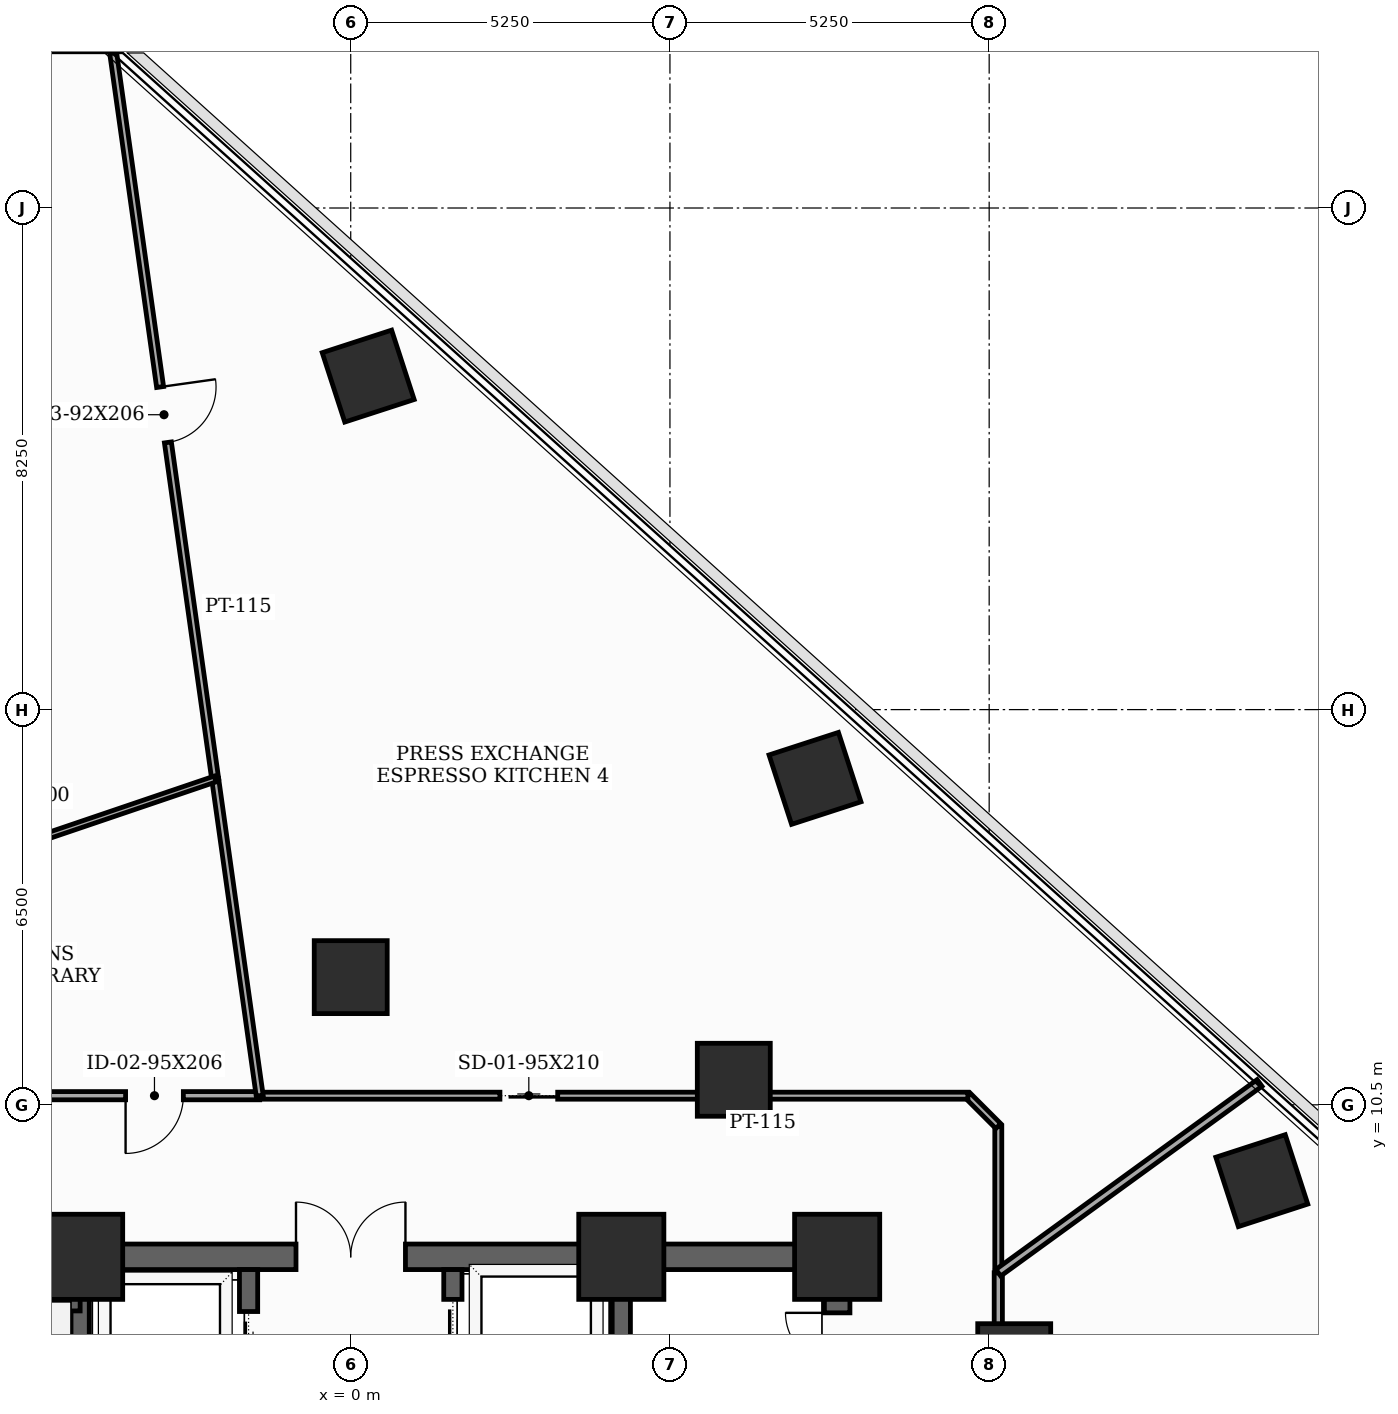
"""IFC4 building model, lengths in metres.
Left out: names, types, materials, properties, quantities, classifications, styles, units other than length and angle.
Written with IfcOpenShell. Run it as: python <this file> out.ifc"""

import sys

from ifc_helpers import new_model, si_unit, direction, frame, frame_2d, origin, origin_2d, place, context, subcontext, project, spatial, rectangle, extrude, element, fill, save


model = new_model("IFC4")
c1 = context("Model", 3, precision=1e-05, world=origin(), true_north=direction((0.0, 1.0)))
c2 = subcontext(c1, "Body", "Model", "MODEL_VIEW")
j1 = project(units=[si_unit("LENGTHUNIT", "METRE"), si_unit("PLANEANGLEUNIT", "RADIAN")], contexts=[c1])
p1 = place(None, origin())
s1 = spatial("IfcSite", under=j1, at=p1, CompositionType="ELEMENT")
p2 = place(p1, origin())
s2 = spatial("IfcBuilding", under=s1, at=p2, CompositionType="ELEMENT")
p3 = place(p2, frame((0.0, 0.0, 116.2)))
s3 = spatial("IfcBuildingStorey", under=s2, at=p3, CompositionType="ELEMENT", Elevation=116.2)
for number, where, z_axis, x_axis in (
    (1, (8.0, 8.0, 0.0), (0.0, 0.0, 1.0), (1.0, 0.0, 0.0)),
    (2, (4.45, 8.0, 0.0), (0.0, 0.0, 1.0), (1.0, 0.0, 0.0)),
    (3, (-4.45, 8.0, 0.0), (0.0, 0.0, 1.0), (1.0, 0.0, 0.0)),
):
    element("IfcColumn", number, at=place(p3, frame(where, z_axis=z_axis, x_axis=x_axis)), inside=s3, PredefinedType="COLUMN", context=c2, shape_type="SweptSolid", body=[
        extrude(rectangle(XDim=1.4, YDim=1.4, at=origin_2d()), origin(), (0.0, 0.0, 1.0), 3.7),
    ])
for number, where, z_axis, x_axis in (
    (4, (10.912, 6.3, 0.0), (0.0, 0.0, 1.0), (1.0, 0.0, 0.0)),
    (5, (6.3, 10.912, 0.0), (0.0, 0.0, 1.0), (1.0, 0.0, 0.0)),
    (6, (0.0, 12.6, 0.0), (0.0, 0.0, 1.0), (1.0, 0.0, 0.0)),
    (7, (14.984, 9.252, 0.0), (0.0, 0.0, 1.0), (0.951, 0.309, 0.0)),
    (8, (7.635, 15.869, 0.0), (0.0, 0.0, 1.0), (0.951, 0.309, 0.0)),
    (9, (0.287, 22.485, 0.0), (0.0, 0.0, 1.0), (0.951, 0.309, 0.0)),
):
    element("IfcColumn", number, at=place(p3, frame(where, z_axis=z_axis, x_axis=x_axis)), inside=s3, PredefinedType="COLUMN", context=c2, shape_type="SweptSolid", body=[
        extrude(rectangle(XDim=1.2, YDim=1.2, at=origin_2d()), origin(), (0.0, 0.0, 1.0), 3.7),
    ])
p4 = place(p3, frame((8.0, -8.0, 0.0), z_axis=(0.0, 0.0, 1.0), x_axis=(0.0, 1.0, 0.0)))
e10 = element("IfcWall", 10, at=p4, inside=s3, PredefinedType="SHEAR", context=c2, shape_type="SweptSolid", body=[
    extrude(rectangle(XDim=16.0, YDim=0.42, at=frame_2d((8.0, 0.0))), origin(), (0.0, 0.0, 1.0), 3.5),
])
p5 = place(p4, frame((9.6, 0.0, 0.0)))
e11 = element("IfcOpeningElement", 11, at=p5, cuts=e10, PredefinedType="OPENING", context=c2, shape_type="SweptSolid", body=[
    extrude(rectangle(XDim=1.05, YDim=2.15, at=frame_2d((0.525, 1.075))), frame((0.0, 0.22, 0.0), z_axis=(0.0, -1.0, 0.0), x_axis=(1.0, 0.0, 0.0)), (0.0, 0.0, 1.0), 0.44),
])
p6 = place(p4, frame((14.229, 0.0, 0.0)))
e12 = element("IfcOpeningElement", 12, at=p6, cuts=e10, PredefinedType="OPENING", context=c2, shape_type="SweptSolid", body=[
    extrude(rectangle(XDim=0.85, YDim=2.02, at=frame_2d((0.425, 1.01))), frame((0.0, 0.22, 0.0), z_axis=(0.0, -1.0, 0.0), x_axis=(1.0, 0.0, 0.0)), (0.0, 0.0, 1.0), 0.44),
])
p7 = place(p3, frame((-8.0, 8.0, 0.0), z_axis=(0.0, 0.0, 1.0), x_axis=(1.0, 0.0, 0.0)))
e13 = element("IfcWall", 13, at=p7, inside=s3, PredefinedType="SHEAR", context=c2, shape_type="SweptSolid", body=[
    extrude(rectangle(XDim=16.0, YDim=0.42, at=frame_2d((8.0, 0.0))), origin(), (0.0, 0.0, 1.0), 3.5),
])
p8 = place(p7, frame((7.1, 0.0, 0.0)))
e14 = element("IfcOpeningElement", 14, at=p8, cuts=e13, PredefinedType="OPENING", context=c2, shape_type="SweptSolid", body=[
    extrude(rectangle(XDim=1.8, YDim=2.15, at=frame_2d((0.9, 1.075))), frame((0.0, 0.22, 0.0), z_axis=(0.0, -1.0, 0.0), x_axis=(1.0, 0.0, 0.0)), (0.0, 0.0, 1.0), 0.44),
])
for number, where, z_axis, x_axis in (
    (15, (-4.45, -7.79, 0.0), (0.0, 0.0, 1.0), (0.0, 1.0, 0.0)),
    (16, (4.45, -7.79, 0.0), (0.0, 0.0, 1.0), (0.0, 1.0, 0.0)),
):
    element("IfcWall", number, at=place(p3, frame(where, z_axis=z_axis, x_axis=x_axis)), inside=s3, PredefinedType="SHEAR", context=c2, shape_type="SweptSolid", body=[
        extrude(rectangle(XDim=15.58, YDim=0.3, at=frame_2d((7.79, 0.0))), origin(), (0.0, 0.0, 1.0), 3.5),
    ])
p9 = place(p3, frame((-7.79, 7.26, 0.0), z_axis=(0.0, 0.0, 1.0), x_axis=(1.0, 0.0, 0.0)))
e17 = element("IfcWall", 17, at=p9, inside=s3, PredefinedType="SHEAR", context=c2, shape_type="SweptSolid", body=[
    extrude(rectangle(XDim=3.34, YDim=0.3, at=frame_2d((1.67, 0.0))), origin(), (0.0, 0.0, 1.0), 3.5),
])
p10 = place(p3, frame((-1.68, -4.85, 0.0), z_axis=(0.0, 0.0, 1.0), x_axis=(0.0, 1.0, 0.0)))
e18 = element("IfcWall", 18, at=p10, inside=s3, PredefinedType="SHEAR", context=c2, shape_type="SweptSolid", body=[
    extrude(rectangle(XDim=12.64, YDim=0.3, at=frame_2d((6.32, 0.0))), origin(), (0.0, 0.0, 1.0), 3.5),
])
p11 = place(p10, frame((3.95, 0.0, 0.0)))
e19 = element("IfcOpeningElement", 19, at=p11, cuts=e18, PredefinedType="OPENING", context=c2, shape_type="SweptSolid", body=[
    extrude(rectangle(XDim=1.1, YDim=2.1, at=frame_2d((0.55, 1.05))), frame((0.0, 0.16, 0.0), z_axis=(0.0, -1.0, 0.0), x_axis=(1.0, 0.0, 0.0)), (0.0, 0.0, 1.0), 0.32),
])
p12 = place(p10, frame((6.25, 0.0, 0.0)))
e20 = element("IfcOpeningElement", 20, at=p12, cuts=e18, PredefinedType="OPENING", context=c2, shape_type="SweptSolid", body=[
    extrude(rectangle(XDim=1.1, YDim=2.1, at=frame_2d((0.55, 1.05))), frame((0.0, 0.16, 0.0), z_axis=(0.0, -1.0, 0.0), x_axis=(1.0, 0.0, 0.0)), (0.0, 0.0, 1.0), 0.32),
])
p13 = place(p10, frame((8.55, 0.0, 0.0)))
e21 = element("IfcOpeningElement", 21, at=p13, cuts=e18, PredefinedType="OPENING", context=c2, shape_type="SweptSolid", body=[
    extrude(rectangle(XDim=1.1, YDim=2.1, at=frame_2d((0.55, 1.05))), frame((0.0, 0.16, 0.0), z_axis=(0.0, -1.0, 0.0), x_axis=(1.0, 0.0, 0.0)), (0.0, 0.0, 1.0), 0.32),
])
p14 = place(p10, frame((10.85, 0.0, 0.0)))
e22 = element("IfcOpeningElement", 22, at=p14, cuts=e18, PredefinedType="OPENING", context=c2, shape_type="SweptSolid", body=[
    extrude(rectangle(XDim=1.1, YDim=2.1, at=frame_2d((0.55, 1.05))), frame((0.0, 0.16, 0.0), z_axis=(0.0, -1.0, 0.0), x_axis=(1.0, 0.0, 0.0)), (0.0, 0.0, 1.0), 0.32),
])
p15 = place(p10, frame((0.45, 0.0, 0.0)))
e23 = element("IfcOpeningElement", 23, at=p15, cuts=e18, PredefinedType="OPENING", context=c2, shape_type="SweptSolid", body=[
    extrude(rectangle(XDim=0.85, YDim=2.02, at=frame_2d((0.425, 1.01))), frame((0.0, 0.16, 0.0), z_axis=(0.0, -1.0, 0.0), x_axis=(1.0, 0.0, 0.0)), (0.0, 0.0, 1.0), 0.32),
])
p16 = place(p10, frame((2.05, 0.0, 0.0)))
e24 = element("IfcOpeningElement", 24, at=p16, cuts=e18, PredefinedType="OPENING", context=c2, shape_type="SweptSolid", body=[
    extrude(rectangle(XDim=0.85, YDim=2.02, at=frame_2d((0.425, 1.01))), frame((0.0, 0.16, 0.0), z_axis=(0.0, -1.0, 0.0), x_axis=(1.0, 0.0, 0.0)), (0.0, 0.0, 1.0), 0.32),
])
p17 = place(p3, frame((1.68, -4.85, 0.0), z_axis=(0.0, 0.0, 1.0), x_axis=(0.0, 1.0, 0.0)))
e25 = element("IfcWall", 25, at=p17, inside=s3, PredefinedType="SHEAR", context=c2, shape_type="SweptSolid", body=[
    extrude(rectangle(XDim=12.64, YDim=0.3, at=frame_2d((6.32, 0.0))), origin(), (0.0, 0.0, 1.0), 3.5),
])
p18 = place(p17, frame((0.55, 0.0, 0.0)))
e26 = element("IfcOpeningElement", 26, at=p18, cuts=e25, PredefinedType="OPENING", context=c2, shape_type="SweptSolid", body=[
    extrude(rectangle(XDim=1.1, YDim=2.1, at=frame_2d((0.55, 1.05))), frame((0.0, 0.16, 0.0), z_axis=(0.0, -1.0, 0.0), x_axis=(1.0, 0.0, 0.0)), (0.0, 0.0, 1.0), 0.32),
])
p19 = place(p17, frame((2.65, 0.0, 0.0)))
e27 = element("IfcOpeningElement", 27, at=p19, cuts=e25, PredefinedType="OPENING", context=c2, shape_type="SweptSolid", body=[
    extrude(rectangle(XDim=1.1, YDim=2.1, at=frame_2d((0.55, 1.05))), frame((0.0, 0.16, 0.0), z_axis=(0.0, -1.0, 0.0), x_axis=(1.0, 0.0, 0.0)), (0.0, 0.0, 1.0), 0.32),
])
p20 = place(p17, frame((4.75, 0.0, 0.0)))
e28 = element("IfcOpeningElement", 28, at=p20, cuts=e25, PredefinedType="OPENING", context=c2, shape_type="SweptSolid", body=[
    extrude(rectangle(XDim=1.1, YDim=2.1, at=frame_2d((0.55, 1.05))), frame((0.0, 0.16, 0.0), z_axis=(0.0, -1.0, 0.0), x_axis=(1.0, 0.0, 0.0)), (0.0, 0.0, 1.0), 0.32),
])
p21 = place(p17, frame((6.85, 0.0, 0.0)))
e29 = element("IfcOpeningElement", 29, at=p21, cuts=e25, PredefinedType="OPENING", context=c2, shape_type="SweptSolid", body=[
    extrude(rectangle(XDim=1.1, YDim=2.1, at=frame_2d((0.55, 1.05))), frame((0.0, 0.16, 0.0), z_axis=(0.0, -1.0, 0.0), x_axis=(1.0, 0.0, 0.0)), (0.0, 0.0, 1.0), 0.32),
])
p22 = place(p17, frame((8.95, 0.0, 0.0)))
e30 = element("IfcOpeningElement", 30, at=p22, cuts=e25, PredefinedType="OPENING", context=c2, shape_type="SweptSolid", body=[
    extrude(rectangle(XDim=1.1, YDim=2.1, at=frame_2d((0.55, 1.05))), frame((0.0, 0.16, 0.0), z_axis=(0.0, -1.0, 0.0), x_axis=(1.0, 0.0, 0.0)), (0.0, 0.0, 1.0), 0.32),
])
p23 = place(p17, frame((11.05, 0.0, 0.0)))
e31 = element("IfcOpeningElement", 31, at=p23, cuts=e25, PredefinedType="OPENING", context=c2, shape_type="SweptSolid", body=[
    extrude(rectangle(XDim=1.1, YDim=2.1, at=frame_2d((0.55, 1.05))), frame((0.0, 0.16, 0.0), z_axis=(0.0, -1.0, 0.0), x_axis=(1.0, 0.0, 0.0)), (0.0, 0.0, 1.0), 0.32),
])
p24 = place(p3, frame((10.65, 3.992, 0.0), z_axis=(0.0, 0.0, 1.0), x_axis=(0.0, 1.0, 0.0)))
e32 = element("IfcWall", 32, at=p24, inside=s3, PredefinedType="PARTITIONING", context=c2, shape_type="SweptSolid", body=[
    extrude(rectangle(XDim=3.746, YDim=0.135, at=frame_2d((1.873, 0.0))), origin(), (0.0, 0.0, 1.0), 2.085),
])
p25 = place(p3, frame((10.65, 7.738, 0.0), z_axis=(0.0, 0.0, 1.0), x_axis=(0.0, 1.0, 0.0)))
e33 = element("IfcWall", 33, at=p25, inside=s3, PredefinedType="PARTITIONING", context=c2, shape_type="SweptSolid", body=[
    extrude(rectangle(XDim=2.412, YDim=0.115, at=frame_2d((1.206, 0.0))), origin(), (0.0, 0.0, 1.0), 2.085),
])
p26 = place(p3, frame((10.65, 10.15, 0.0), z_axis=(0.0, 0.0, 1.0), x_axis=(-0.707106781187, 0.707106781187, 0.0)))
e34 = element("IfcWall", 34, at=p26, inside=s3, PredefinedType="PARTITIONING", context=c2, shape_type="SweptSolid", body=[
    extrude(rectangle(XDim=0.707, YDim=0.115, at=frame_2d((0.354, 0.0))), origin(), (0.0, 0.0, 1.0), 3.125),
])
p27 = place(p3, frame((10.15, 10.65, 0.0), z_axis=(0.0, 0.0, 1.0), x_axis=(-1.0, 0.0, 0.0)))
e35 = element("IfcWall", 35, at=p27, inside=s3, PredefinedType="PARTITIONING", context=c2, shape_type="SweptSolid", body=[
    extrude(rectangle(XDim=11.647, YDim=0.115, at=frame_2d((5.823, 0.0))), origin(), (0.0, 0.0, 1.0), 2.785),
])
p28 = place(p27, frame((6.746, 0.0, 0.0)))
e36 = element("IfcOpeningElement", 36, at=p28, cuts=e35, PredefinedType="OPENING", context=c2, shape_type="SweptSolid", body=[
    extrude(rectangle(XDim=0.95, YDim=2.1, at=frame_2d((0.475, 1.05))), frame((0.0, 0.067, 0.0), z_axis=(0.0, -1.0, 0.0), x_axis=(1.0, 0.0, 0.0)), (0.0, 0.0, 1.0), 0.135),
])
p29 = place(p3, frame((-1.497, 10.65, 0.0), z_axis=(0.0, 0.0, 1.0), x_axis=(-1.0, 0.0, 0.0)))
e37 = element("IfcWall", 37, at=p29, inside=s3, PredefinedType="PARTITIONING", context=c2, shape_type="SweptSolid", body=[
    extrude(rectangle(XDim=8.653, YDim=0.135, at=frame_2d((4.326, 0.0))), origin(), (0.0, 0.0, 1.0), 2.085),
])
p30 = place(p29, frame((1.256, 0.0, 0.0)))
e38 = element("IfcOpeningElement", 38, at=p30, cuts=e37, PredefinedType="OPENING", context=c2, shape_type="SweptSolid", body=[
    extrude(rectangle(XDim=0.95, YDim=2.035, at=frame_2d((0.475, 1.018))), frame((0.0, 0.077, 0.0), z_axis=(0.0, -1.0, 0.0), x_axis=(1.0, 0.0, 0.0)), (0.0, 0.0, 1.0), 0.155),
])
p31 = place(p3, frame((14.947, 10.86, 0.0), z_axis=(0.0, 0.0, 1.0), x_axis=(-0.809014262986, -0.587789011708, 0.0)))
e39 = element("IfcWall", 39, at=p31, inside=s3, PredefinedType="PARTITIONING", context=c2, shape_type="SweptSolid", body=[
    extrude(rectangle(XDim=5.312, YDim=0.135, at=frame_2d((2.656, 0.0))), origin(), (0.0, 0.0, 1.0), 2.085),
])
p32 = place(p3, frame((-3.913, 27.841, 0.0), z_axis=(0.0, 0.0, 1.0), x_axis=(0.139138590951, -0.990272918194, 0.0)))
e40 = element("IfcWall", 40, at=p32, inside=s3, PredefinedType="PARTITIONING", context=c2, shape_type="SweptSolid", body=[
    extrude(rectangle(XDim=12.1, YDim=0.115, at=frame_2d((6.05, 0.0))), origin(), (0.0, 0.0, 1.0), 2.085),
])
p33 = place(p32, frame((5.59, 0.0, 0.0)))
e41 = element("IfcOpeningElement", 41, at=p33, cuts=e40, PredefinedType="OPENING", context=c2, shape_type="SweptSolid", body=[
    extrude(rectangle(XDim=0.92, YDim=2.035, at=frame_2d((0.46, 1.018))), frame((0.0, 0.067, 0.0), z_axis=(0.0, -1.0, 0.0), x_axis=(1.0, 0.0, 0.0)), (0.0, 0.0, 1.0), 0.135),
])
p34 = place(p3, frame((-2.229, 15.859, 0.0), z_axis=(0.0, 0.0, 1.0), x_axis=(0.139146736844, -0.990271773619, 0.0)))
e42 = element("IfcWall", 42, at=p34, inside=s3, PredefinedType="PARTITIONING", context=c2, shape_type="SweptSolid", body=[
    extrude(rectangle(XDim=5.26, YDim=0.115, at=frame_2d((2.63, 0.0))), origin(), (0.0, 0.0, 1.0), 2.785),
])
p35 = place(p3, frame((-8.292, 13.8, 0.0), z_axis=(0.0, 0.0, 1.0), x_axis=(0.946895388767, 0.321541790025, 0.0)))
e43 = element("IfcWall", 43, at=p35, inside=s3, PredefinedType="MOVABLE", context=c2, shape_type="SweptSolid", body=[
    extrude(rectangle(XDim=6.403, YDim=0.1, at=frame_2d((3.202, 0.0))), origin(), (0.0, 0.0, 1.0), 2.085),
])
p36 = place(p6, origin())
e44 = element("IfcDoor", 44, at=p36, inside=s3, OperationType="SINGLE_SWING_RIGHT", PredefinedType="TRAPDOOR", context=c2, shape_type="SweptSolid", body=[
    extrude(rectangle(XDim=0.85, YDim=2.02, at=frame_2d((0.425, 1.01))), frame((0.0, 0.025, 0.0), z_axis=(0.0, -1.0, 0.0), x_axis=(1.0, 0.0, 0.0)), (0.0, 0.0, 1.0), 0.05),
])
fill(e12, e44)
p37 = place(p8, origin())
e45 = element("IfcDoor", 45, at=p37, inside=s3, OperationType="DOUBLE_DOOR_SINGLE_SWING", PredefinedType="DOOR", context=c2, shape_type="SweptSolid", body=[
    extrude(rectangle(XDim=1.8, YDim=2.15, at=frame_2d((0.9, 1.075))), frame((0.0, 0.025, 0.0), z_axis=(0.0, -1.0, 0.0), x_axis=(1.0, 0.0, 0.0)), (0.0, 0.0, 1.0), 0.05),
])
fill(e14, e45)
p38 = place(p14, origin())
e46 = element("IfcDoor", 46, at=p38, inside=s3, OperationType="SLIDING_TO_LEFT", PredefinedType="DOOR", context=c2, shape_type="SweptSolid", body=[
    extrude(rectangle(XDim=1.1, YDim=2.1, at=frame_2d((0.55, 1.05))), frame((0.0, 0.025, 0.0), z_axis=(0.0, -1.0, 0.0), x_axis=(1.0, 0.0, 0.0)), (0.0, 0.0, 1.0), 0.05),
])
fill(e22, e46)
p39 = place(p23, origin())
e47 = element("IfcDoor", 47, at=p39, inside=s3, OperationType="SLIDING_TO_LEFT", PredefinedType="DOOR", context=c2, shape_type="SweptSolid", body=[
    extrude(rectangle(XDim=1.1, YDim=2.1, at=frame_2d((0.55, 1.05))), frame((0.0, 0.025, 0.0), z_axis=(0.0, -1.0, 0.0), x_axis=(1.0, 0.0, 0.0)), (0.0, 0.0, 1.0), 0.05),
])
fill(e31, e47)
p40 = place(p28, origin())
e48 = element("IfcDoor", 48, at=p40, inside=s3, OperationType="SLIDING_TO_LEFT", PredefinedType="DOOR", context=c2, shape_type="SweptSolid", body=[
    extrude(rectangle(XDim=0.95, YDim=2.1, at=frame_2d((0.475, 1.05))), frame((0.0, 0.025, 0.0), z_axis=(0.0, -1.0, 0.0), x_axis=(1.0, 0.0, 0.0)), (0.0, 0.0, 1.0), 0.05),
])
fill(e36, e48)
p41 = place(p30, origin())
e49 = element("IfcDoor", 49, at=p41, inside=s3, OperationType="SINGLE_SWING_RIGHT", PredefinedType="DOOR", context=c2, shape_type="SweptSolid", body=[
    extrude(rectangle(XDim=0.95, YDim=2.035, at=frame_2d((0.475, 1.018))), frame((0.0, 0.025, 0.0), z_axis=(0.0, -1.0, 0.0), x_axis=(1.0, 0.0, 0.0)), (0.0, 0.0, 1.0), 0.05),
])
fill(e38, e49)
p42 = place(p33, origin())
e50 = element("IfcDoor", 50, at=p42, inside=s3, OperationType="SINGLE_SWING_LEFT", PredefinedType="DOOR", context=c2, shape_type="SweptSolid", body=[
    extrude(rectangle(XDim=0.92, YDim=2.035, at=frame_2d((0.46, 1.018))), frame((0.0, 0.025, 0.0), z_axis=(0.0, -1.0, 0.0), x_axis=(1.0, 0.0, 0.0)), (0.0, 0.0, 1.0), 0.05),
])
fill(e41, e50)
save(model, sys.argv[1])
